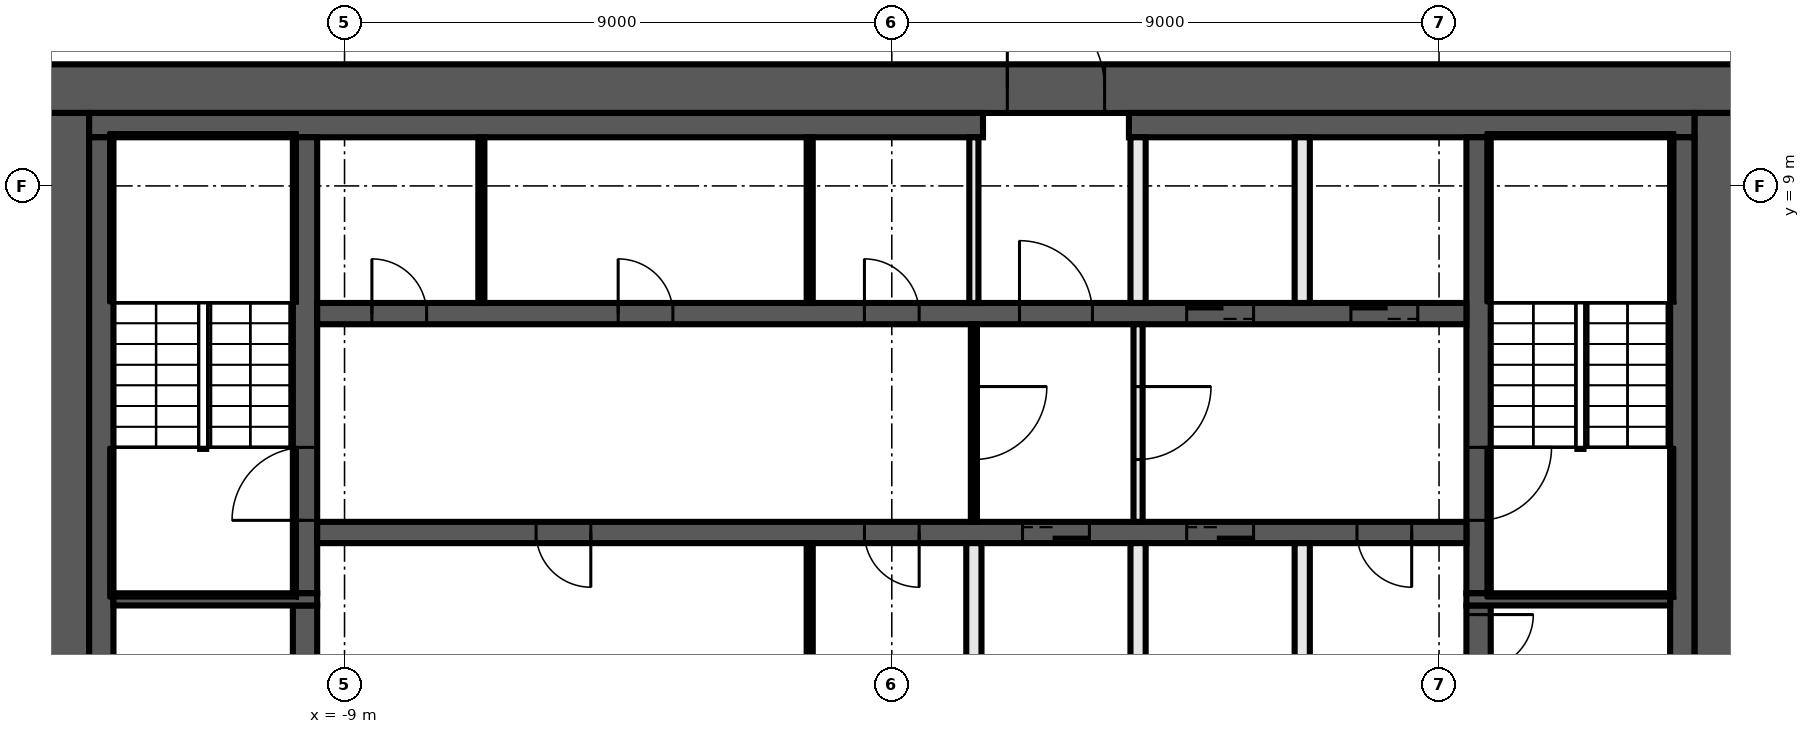
"""IFC4 building model, lengths in metres.
Left out: names, types, materials, properties, quantities, classifications, styles, units other than length and angle.
Written with IfcOpenShell. Run it as: python <this file> out.ifc"""

import sys

from ifc_helpers import new_model, si_unit, direction, frame, frame_2d, origin, place, context, subcontext, project, spatial, rectangle, extrude, element, fill, save


model = new_model("IFC4")
c1 = context("Model", 3, precision=1e-05, world=origin(), true_north=direction((0.0, 1.0)))
c2 = subcontext(c1, "Body", "Model", "MODEL_VIEW")
j1 = project(units=[si_unit("LENGTHUNIT", "METRE"), si_unit("PLANEANGLEUNIT", "RADIAN")], contexts=[c1])
p1 = place(None, origin())
s1 = spatial("IfcSite", under=j1, at=p1, CompositionType="ELEMENT")
p2 = place(p1, origin())
s2 = spatial("IfcBuilding", under=s1, at=p2, CompositionType="ELEMENT")
p3 = place(p2, frame((0.0, 0.0, 220.6)))
s3 = spatial("IfcBuildingStorey", under=s2, at=p3, CompositionType="ELEMENT", Elevation=220.6)
p4 = place(p3, frame((23.434, 8.496, 0.0), z_axis=(0.0, 0.0, 1.0), x_axis=(-0.676389444632, 0.736544173278, 0.0)))
e1 = element("IfcWall", 1, at=p4, inside=s3, PredefinedType="SOLIDWALL", context=c2, shape_type="SweptSolid", body=[
    extrude(rectangle(XDim=16.855, YDim=0.25, at=frame_2d((8.428, 0.0))), origin(), (0.0, 0.0, 1.0), 7.55),
])
p5 = place(p3, frame((-14.0, 10.6, 0.0), z_axis=(0.0, 0.0, 1.0), x_axis=(1.0, 0.0, 0.0)))
e2 = element("IfcWall", 2, at=p5, inside=s3, PredefinedType="SHEAR", context=c2, shape_type="SweptSolid", body=[
    extrude(rectangle(XDim=28.0, YDim=0.8, at=frame_2d((14.0, 0.0))), origin(), (0.0, 0.0, 1.0), 7.55),
])
p6 = place(p5, frame((15.9, 0.0, 0.0)))
e3 = element("IfcOpeningElement", 3, at=p6, cuts=e2, PredefinedType="OPENING", context=c2, shape_type="SweptSolid", body=[
    extrude(rectangle(XDim=1.6, YDim=2.1, at=frame_2d((0.8, 1.05))), frame((0.0, 0.41, 0.0), z_axis=(0.0, -1.0, 0.0), x_axis=(1.0, 0.0, 0.0)), (0.0, 0.0, 1.0), 0.82),
])
for number, where, z_axis, x_axis in (
    (4, (13.6, 10.2, 0.0), (0.0, 0.0, 1.0), (0.0, -1.0, 0.0)),
    (5, (-13.6, -10.2, 0.0), (0.0, 0.0, 1.0), (0.0, 1.0, 0.0)),
):
    element("IfcWall", number, at=place(p3, frame(where, z_axis=z_axis, x_axis=x_axis)), inside=s3, PredefinedType="SHEAR", context=c2, shape_type="SweptSolid", body=[
        extrude(rectangle(XDim=20.4, YDim=0.8, at=frame_2d((10.2, 0.0))), origin(), (0.0, 0.0, 1.0), 7.55),
    ])
p7 = place(p3, frame((-13.2, 10.0, 0.0), z_axis=(0.0, 0.0, 1.0), x_axis=(1.0, 0.0, 0.0)))
e6 = element("IfcWall", 6, at=p7, inside=s3, PredefinedType="SHEAR", context=c2, shape_type="SweptSolid", body=[
    extrude(rectangle(XDim=14.7, YDim=0.4, at=frame_2d((7.35, 0.0))), origin(), (0.0, 0.0, 1.0), 7.55),
])
p8 = place(p3, frame((3.9, 10.0, 0.0), z_axis=(0.0, 0.0, 1.0), x_axis=(1.0, 0.0, 0.0)))
e7 = element("IfcWall", 7, at=p8, inside=s3, PredefinedType="SHEAR", context=c2, shape_type="SweptSolid", body=[
    extrude(rectangle(XDim=9.3, YDim=0.4, at=frame_2d((4.65, 0.0))), origin(), (0.0, 0.0, 1.0), 7.55),
])
for number, where, z_axis, x_axis in (
    (8, (13.0, 9.8, 0.0), (0.0, 0.0, 1.0), (0.0, -1.0, 0.0)),
    (9, (-13.0, -9.8, 0.0), (0.0, 0.0, 1.0), (0.0, 1.0, 0.0)),
):
    element("IfcWall", number, at=place(p3, frame(where, z_axis=z_axis, x_axis=x_axis)), inside=s3, PredefinedType="SHEAR", context=c2, shape_type="SweptSolid", body=[
        extrude(rectangle(XDim=19.6, YDim=0.4, at=frame_2d((9.8, 0.0))), origin(), (0.0, 0.0, 1.0), 7.55),
    ])
p9 = place(p3, frame((9.65, 2.1, 0.0), z_axis=(0.0, 0.0, 1.0), x_axis=(0.0, -1.0, 0.0)))
e10 = element("IfcWall", 10, at=p9, inside=s3, PredefinedType="SHEAR", context=c2, shape_type="SweptSolid", body=[
    extrude(rectangle(XDim=4.2, YDim=0.4, at=frame_2d((2.1, 0.0))), origin(), (0.0, 0.0, 1.0), 7.55),
])
p10 = place(p9, frame((0.15, 0.0, 0.0)))
e11 = element("IfcOpeningElement", 11, at=p10, cuts=e10, PredefinedType="OPENING", context=c2, shape_type="SweptSolid", body=[
    extrude(rectangle(XDim=0.9, YDim=2.1, at=frame_2d((0.45, 1.05))), frame((0.0, 0.21, 0.0), z_axis=(0.0, -1.0, 0.0), x_axis=(1.0, 0.0, 0.0)), (0.0, 0.0, 1.0), 0.42),
])
p11 = place(p3, frame((9.65, 9.8, 0.0), z_axis=(0.0, 0.0, 1.0), x_axis=(0.0, -1.0, 0.0)))
e12 = element("IfcWall", 12, at=p11, inside=s3, PredefinedType="SHEAR", context=c2, shape_type="SweptSolid", body=[
    extrude(rectangle(XDim=7.5, YDim=0.4, at=frame_2d((3.75, 0.0))), origin(), (0.0, 0.0, 1.0), 7.55),
])
p12 = place(p11, frame((5.1, 0.0, 0.0)))
e13 = element("IfcOpeningElement", 13, at=p12, cuts=e12, PredefinedType="OPENING", context=c2, shape_type="SweptSolid", body=[
    extrude(rectangle(XDim=1.2, YDim=2.1, at=frame_2d((0.6, 1.05))), frame((0.0, 0.21, 0.0), z_axis=(0.0, -1.0, 0.0), x_axis=(1.0, 0.0, 0.0)), (0.0, 0.0, 1.0), 0.42),
])
p13 = place(p3, frame((-9.65, -2.1, 0.0), z_axis=(0.0, 0.0, 1.0), x_axis=(0.0, 1.0, 0.0)))
e14 = element("IfcWall", 14, at=p13, inside=s3, PredefinedType="SHEAR", context=c2, shape_type="SweptSolid", body=[
    extrude(rectangle(XDim=4.2, YDim=0.4, at=frame_2d((2.1, 0.0))), origin(), (0.0, 0.0, 1.0), 7.55),
])
p14 = place(p3, frame((-9.65, 2.3, 0.0), z_axis=(0.0, 0.0, 1.0), x_axis=(0.0, 1.0, 0.0)))
e15 = element("IfcWall", 15, at=p14, inside=s3, PredefinedType="SHEAR", context=c2, shape_type="SweptSolid", body=[
    extrude(rectangle(XDim=7.5, YDim=0.4, at=frame_2d((3.75, 0.0))), origin(), (0.0, 0.0, 1.0), 7.55),
])
p15 = place(p14, frame((1.2, 0.0, 0.0)))
e16 = element("IfcOpeningElement", 16, at=p15, cuts=e15, PredefinedType="OPENING", context=c2, shape_type="SweptSolid", body=[
    extrude(rectangle(XDim=1.2, YDim=2.1, at=frame_2d((0.6, 1.05))), frame((0.0, 0.21, 0.0), z_axis=(0.0, -1.0, 0.0), x_axis=(1.0, 0.0, 0.0)), (0.0, 0.0, 1.0), 0.42),
])
for number, where, z_axis, x_axis in (
    (17, (9.45, 2.2, 0.0), (0.0, 0.0, 1.0), (1.0, 0.0, 0.0)),
    (18, (-9.45, 2.2, 0.0), (0.0, 0.0, 1.0), (-1.0, 0.0, 0.0)),
):
    element("IfcWall", number, at=place(p3, frame(where, z_axis=z_axis, x_axis=x_axis)), inside=s3, PredefinedType="SHEAR", context=c2, shape_type="SweptSolid", body=[
        extrude(rectangle(XDim=3.35, YDim=0.2, at=frame_2d((1.675, 0.0))), origin(), (0.0, 0.0, 1.0), 7.55),
    ])
p16 = place(p3, frame((-9.45, 6.9, 0.0), z_axis=(0.0, 0.0, 1.0), x_axis=(1.0, 0.0, 0.0)))
e19 = element("IfcWall", 19, at=p16, inside=s3, PredefinedType="SHEAR", context=c2, shape_type="SweptSolid", body=[
    extrude(rectangle(XDim=18.9, YDim=0.35, at=frame_2d((9.45, 0.0))), origin(), (0.0, 0.0, 1.0), 7.55),
])
p17 = place(p16, frame((11.55, 0.0, 0.0)))
e20 = element("IfcOpeningElement", 20, at=p17, cuts=e19, PredefinedType="OPENING", context=c2, shape_type="SweptSolid", body=[
    extrude(rectangle(XDim=1.2, YDim=2.1, at=frame_2d((0.6, 1.05))), frame((0.0, 0.185, 0.0), z_axis=(0.0, -1.0, 0.0), x_axis=(1.0, 0.0, 0.0)), (0.0, 0.0, 1.0), 0.37),
])
p18 = place(p16, frame((14.3, 0.0, 0.0)))
e21 = element("IfcOpeningElement", 21, at=p18, cuts=e19, PredefinedType="OPENING", context=c2, shape_type="SweptSolid", body=[
    extrude(rectangle(XDim=1.1, YDim=2.1, at=frame_2d((0.55, 1.05))), frame((0.0, 0.185, 0.0), z_axis=(0.0, -1.0, 0.0), x_axis=(1.0, 0.0, 0.0)), (0.0, 0.0, 1.0), 0.37),
])
p19 = place(p16, frame((17.0, 0.0, 0.0)))
e22 = element("IfcOpeningElement", 22, at=p19, cuts=e19, PredefinedType="OPENING", context=c2, shape_type="SweptSolid", body=[
    extrude(rectangle(XDim=1.1, YDim=2.1, at=frame_2d((0.55, 1.05))), frame((0.0, 0.185, 0.0), z_axis=(0.0, -1.0, 0.0), x_axis=(1.0, 0.0, 0.0)), (0.0, 0.0, 1.0), 0.37),
])
p20 = place(p16, frame((0.9, 0.0, 0.0)))
e23 = element("IfcOpeningElement", 23, at=p20, cuts=e19, PredefinedType="OPENING", context=c2, shape_type="SweptSolid", body=[
    extrude(rectangle(XDim=0.9, YDim=2.1, at=frame_2d((0.45, 1.05))), frame((0.0, 0.185, 0.0), z_axis=(0.0, -1.0, 0.0), x_axis=(1.0, 0.0, 0.0)), (0.0, 0.0, 1.0), 0.37),
])
p21 = place(p16, frame((4.95, 0.0, 0.0)))
e24 = element("IfcOpeningElement", 24, at=p21, cuts=e19, PredefinedType="OPENING", context=c2, shape_type="SweptSolid", body=[
    extrude(rectangle(XDim=0.9, YDim=2.1, at=frame_2d((0.45, 1.05))), frame((0.0, 0.185, 0.0), z_axis=(0.0, -1.0, 0.0), x_axis=(1.0, 0.0, 0.0)), (0.0, 0.0, 1.0), 0.37),
])
p22 = place(p16, frame((9.0, 0.0, 0.0)))
e25 = element("IfcOpeningElement", 25, at=p22, cuts=e19, PredefinedType="OPENING", context=c2, shape_type="SweptSolid", body=[
    extrude(rectangle(XDim=0.9, YDim=2.1, at=frame_2d((0.45, 1.05))), frame((0.0, 0.185, 0.0), z_axis=(0.0, -1.0, 0.0), x_axis=(1.0, 0.0, 0.0)), (0.0, 0.0, 1.0), 0.37),
])
p23 = place(p3, frame((9.45, 3.3, 0.0), z_axis=(0.0, 0.0, 1.0), x_axis=(-1.0, 0.0, 0.0)))
e26 = element("IfcWall", 26, at=p23, inside=s3, PredefinedType="SHEAR", context=c2, shape_type="SweptSolid", body=[
    extrude(rectangle(XDim=18.9, YDim=0.35, at=frame_2d((9.45, 0.0))), origin(), (0.0, 0.0, 1.0), 7.55),
])
p24 = place(p23, frame((6.2, 0.0, 0.0)))
e27 = element("IfcOpeningElement", 27, at=p24, cuts=e26, PredefinedType="OPENING", context=c2, shape_type="SweptSolid", body=[
    extrude(rectangle(XDim=1.1, YDim=2.1, at=frame_2d((0.55, 1.05))), frame((0.0, 0.185, 0.0), z_axis=(0.0, -1.0, 0.0), x_axis=(1.0, 0.0, 0.0)), (0.0, 0.0, 1.0), 0.37),
])
p25 = place(p23, frame((3.5, 0.0, 0.0)))
e28 = element("IfcOpeningElement", 28, at=p25, cuts=e26, PredefinedType="OPENING", context=c2, shape_type="SweptSolid", body=[
    extrude(rectangle(XDim=1.1, YDim=2.1, at=frame_2d((0.55, 1.05))), frame((0.0, 0.185, 0.0), z_axis=(0.0, -1.0, 0.0), x_axis=(1.0, 0.0, 0.0)), (0.0, 0.0, 1.0), 0.37),
])
p26 = place(p23, frame((0.9, 0.0, 0.0)))
e29 = element("IfcOpeningElement", 29, at=p26, cuts=e26, PredefinedType="OPENING", context=c2, shape_type="SweptSolid", body=[
    extrude(rectangle(XDim=0.9, YDim=2.1, at=frame_2d((0.45, 1.05))), frame((0.0, 0.185, 0.0), z_axis=(0.0, -1.0, 0.0), x_axis=(1.0, 0.0, 0.0)), (0.0, 0.0, 1.0), 0.37),
])
p27 = place(p23, frame((14.4, 0.0, 0.0)))
e30 = element("IfcOpeningElement", 30, at=p27, cuts=e26, PredefinedType="OPENING", context=c2, shape_type="SweptSolid", body=[
    extrude(rectangle(XDim=0.9, YDim=2.1, at=frame_2d((0.45, 1.05))), frame((0.0, 0.185, 0.0), z_axis=(0.0, -1.0, 0.0), x_axis=(1.0, 0.0, 0.0)), (0.0, 0.0, 1.0), 0.37),
])
p28 = place(p23, frame((9.0, 0.0, 0.0)))
e31 = element("IfcOpeningElement", 31, at=p28, cuts=e26, PredefinedType="OPENING", context=c2, shape_type="SweptSolid", body=[
    extrude(rectangle(XDim=0.9, YDim=2.1, at=frame_2d((0.45, 1.05))), frame((0.0, 0.185, 0.0), z_axis=(0.0, -1.0, 0.0), x_axis=(1.0, 0.0, 0.0)), (0.0, 0.0, 1.0), 0.37),
])
for number, where, z_axis, x_axis in (
    (32, (6.75, 0.4, 0.0), (0.0, 0.0, 1.0), (0.0, 1.0, 0.0)),
    (33, (6.75, 7.075, 0.0), (0.0, 0.0, 1.0), (0.0, 1.0, 0.0)),
):
    element("IfcWall", number, at=place(p3, frame(where, z_axis=z_axis, x_axis=x_axis)), inside=s3, PredefinedType="SOLIDWALL", context=c2, shape_type="SweptSolid", body=[
        extrude(rectangle(XDim=2.725, YDim=0.25, at=frame_2d((1.363, 0.0))), origin(), (0.0, 0.0, 1.0), 7.55),
    ])
p29 = place(p3, frame((4.05, 6.725, 0.0), z_axis=(0.0, 0.0, 1.0), x_axis=(0.0, -1.0, 0.0)))
e34 = element("IfcWall", 34, at=p29, inside=s3, PredefinedType="PARTITIONING", context=c2, shape_type="SweptSolid", body=[
    extrude(rectangle(XDim=3.25, YDim=0.15, at=frame_2d((1.625, 0.0))), origin(), (0.0, 0.0, 1.0), 7.55),
])
p30 = place(p29, frame((1.025, 0.0, 0.0)))
e35 = element("IfcOpeningElement", 35, at=p30, cuts=e34, PredefinedType="OPENING", context=c2, shape_type="SweptSolid", body=[
    extrude(rectangle(XDim=1.2, YDim=2.1, at=frame_2d((0.6, 1.05))), frame((0.0, 0.085, 0.0), z_axis=(0.0, -1.0, 0.0), x_axis=(1.0, 0.0, 0.0)), (0.0, 0.0, 1.0), 0.17),
])
for number, where, z_axis, x_axis in (
    (36, (4.05, 0.4, 0.0), (0.0, 0.0, 1.0), (0.0, 1.0, 0.0)),
    (37, (4.05, 7.075, 0.0), (0.0, 0.0, 1.0), (0.0, 1.0, 0.0)),
):
    element("IfcWall", number, at=place(p3, frame(where, z_axis=z_axis, x_axis=x_axis)), inside=s3, PredefinedType="SOLIDWALL", context=c2, shape_type="SweptSolid", body=[
        extrude(rectangle(XDim=2.725, YDim=0.25, at=frame_2d((1.363, 0.0))), origin(), (0.0, 0.0, 1.0), 7.55),
    ])
p31 = place(p3, frame((1.35, 7.075, 0.0), z_axis=(0.0, 0.0, 1.0), x_axis=(0.0, 1.0, 0.0)))
e38 = element("IfcWall", 38, at=p31, inside=s3, PredefinedType="PARTITIONING", context=c2, shape_type="SweptSolid", body=[
    extrude(rectangle(XDim=2.725, YDim=0.15, at=frame_2d((1.363, 0.0))), origin(), (0.0, 0.0, 1.0), 7.55),
])
p32 = place(p3, frame((1.35, 6.725, 0.0), z_axis=(0.0, 0.0, 1.0), x_axis=(0.0, -1.0, 0.0)))
e39 = element("IfcWall", 39, at=p32, inside=s3, PredefinedType="PARTITIONING", context=c2, shape_type="SweptSolid", body=[
    extrude(rectangle(XDim=3.25, YDim=0.1, at=frame_2d((1.625, 0.0))), origin(), (0.0, 0.0, 1.0), 7.55),
])
p33 = place(p32, frame((1.025, 0.0, 0.0)))
e40 = element("IfcOpeningElement", 40, at=p33, cuts=e39, PredefinedType="OPENING", context=c2, shape_type="SweptSolid", body=[
    extrude(rectangle(XDim=1.2, YDim=2.1, at=frame_2d((0.6, 1.05))), frame((0.0, 0.06, 0.0), z_axis=(0.0, -1.0, 0.0), x_axis=(1.0, 0.0, 0.0)), (0.0, 0.0, 1.0), 0.12),
])
p34 = place(p3, frame((1.35, 0.4, 0.0), z_axis=(0.0, 0.0, 1.0), x_axis=(0.0, 1.0, 0.0)))
e41 = element("IfcWall", 41, at=p34, inside=s3, PredefinedType="SOLIDWALL", context=c2, shape_type="SweptSolid", body=[
    extrude(rectangle(XDim=2.725, YDim=0.25, at=frame_2d((1.363, 0.0))), origin(), (0.0, 0.0, 1.0), 7.55),
])
for number, where, z_axis, x_axis in (
    (42, (-1.35, 0.4, 0.0), (0.0, 0.0, 1.0), (0.0, 1.0, 0.0)),
    (43, (-1.35, 7.075, 0.0), (0.0, 0.0, 1.0), (0.0, 1.0, 0.0)),
    (44, (-6.75, 7.075, 0.0), (0.0, 0.0, 1.0), (0.0, 1.0, 0.0)),
):
    element("IfcWall", number, at=place(p3, frame(where, z_axis=z_axis, x_axis=x_axis)), inside=s3, PredefinedType="PARTITIONING", context=c2, shape_type="SweptSolid", body=[
        extrude(rectangle(XDim=2.725, YDim=0.1, at=frame_2d((1.363, 0.0))), origin(), (0.0, 0.0, 1.0), 7.55),
    ])
p35 = place(p10, origin())
e45 = element("IfcDoor", 45, at=p35, inside=s3, OperationType="SINGLE_SWING_RIGHT", PredefinedType="DOOR", context=c2, shape_type="SweptSolid", body=[
    extrude(rectangle(XDim=0.9, YDim=2.1, at=frame_2d((0.45, 1.05))), frame((0.0, 0.025, 0.0), z_axis=(0.0, -1.0, 0.0), x_axis=(1.0, 0.0, 0.0)), (0.0, 0.0, 1.0), 0.05),
])
fill(e11, e45)
p36 = place(p6, origin())
e46 = element("IfcDoor", 46, at=p36, inside=s3, OperationType="DOUBLE_DOOR_SINGLE_SWING", PredefinedType="DOOR", context=c2, shape_type="SweptSolid", body=[
    extrude(rectangle(XDim=1.6, YDim=2.1, at=frame_2d((0.8, 1.05))), frame((0.0, 0.025, 0.0), z_axis=(0.0, -1.0, 0.0), x_axis=(1.0, 0.0, 0.0)), (0.0, 0.0, 1.0), 0.05),
])
fill(e3, e46)
p37 = place(p17, origin())
e47 = element("IfcDoor", 47, at=p37, inside=s3, OperationType="SINGLE_SWING_LEFT", PredefinedType="DOOR", context=c2, shape_type="SweptSolid", body=[
    extrude(rectangle(XDim=1.2, YDim=2.1, at=frame_2d((0.6, 1.05))), frame((0.0, 0.025, 0.0), z_axis=(0.0, -1.0, 0.0), x_axis=(1.0, 0.0, 0.0)), (0.0, 0.0, 1.0), 0.05),
])
fill(e20, e47)
p38 = place(p18, origin())
e48 = element("IfcDoor", 48, at=p38, inside=s3, OperationType="DOUBLE_DOOR_SLIDING", PredefinedType="DOOR", context=c2, shape_type="SweptSolid", body=[
    extrude(rectangle(XDim=1.1, YDim=2.1, at=frame_2d((0.55, 1.05))), frame((0.0, 0.025, 0.0), z_axis=(0.0, -1.0, 0.0), x_axis=(1.0, 0.0, 0.0)), (0.0, 0.0, 1.0), 0.05),
])
fill(e21, e48)
p39 = place(p19, origin())
e49 = element("IfcDoor", 49, at=p39, inside=s3, OperationType="DOUBLE_DOOR_SLIDING", PredefinedType="DOOR", context=c2, shape_type="SweptSolid", body=[
    extrude(rectangle(XDim=1.1, YDim=2.1, at=frame_2d((0.55, 1.05))), frame((0.0, 0.025, 0.0), z_axis=(0.0, -1.0, 0.0), x_axis=(1.0, 0.0, 0.0)), (0.0, 0.0, 1.0), 0.05),
])
fill(e22, e49)
p40 = place(p24, origin())
e50 = element("IfcDoor", 50, at=p40, inside=s3, OperationType="DOUBLE_DOOR_SLIDING", PredefinedType="DOOR", context=c2, shape_type="SweptSolid", body=[
    extrude(rectangle(XDim=1.1, YDim=2.1, at=frame_2d((0.55, 1.05))), frame((0.0, 0.025, 0.0), z_axis=(0.0, -1.0, 0.0), x_axis=(1.0, 0.0, 0.0)), (0.0, 0.0, 1.0), 0.05),
])
fill(e27, e50)
p41 = place(p25, origin())
e51 = element("IfcDoor", 51, at=p41, inside=s3, OperationType="DOUBLE_DOOR_SLIDING", PredefinedType="DOOR", context=c2, shape_type="SweptSolid", body=[
    extrude(rectangle(XDim=1.1, YDim=2.1, at=frame_2d((0.55, 1.05))), frame((0.0, 0.025, 0.0), z_axis=(0.0, -1.0, 0.0), x_axis=(1.0, 0.0, 0.0)), (0.0, 0.0, 1.0), 0.05),
])
fill(e28, e51)
p42 = place(p26, origin())
e52 = element("IfcDoor", 52, at=p42, inside=s3, OperationType="SINGLE_SWING_LEFT", PredefinedType="DOOR", context=c2, shape_type="SweptSolid", body=[
    extrude(rectangle(XDim=0.9, YDim=2.1, at=frame_2d((0.45, 1.05))), frame((0.0, 0.025, 0.0), z_axis=(0.0, -1.0, 0.0), x_axis=(1.0, 0.0, 0.0)), (0.0, 0.0, 1.0), 0.05),
])
fill(e29, e52)
p43 = place(p20, origin())
e53 = element("IfcDoor", 53, at=p43, inside=s3, OperationType="SINGLE_SWING_RIGHT", PredefinedType="DOOR", context=c2, shape_type="SweptSolid", body=[
    extrude(rectangle(XDim=0.9, YDim=2.1, at=frame_2d((0.45, 1.05))), frame((0.0, 0.025, 0.0), z_axis=(0.0, -1.0, 0.0), x_axis=(1.0, 0.0, 0.0)), (0.0, 0.0, 1.0), 0.05),
])
fill(e23, e53)
p44 = place(p21, origin())
e54 = element("IfcDoor", 54, at=p44, inside=s3, OperationType="SINGLE_SWING_LEFT", PredefinedType="DOOR", context=c2, shape_type="SweptSolid", body=[
    extrude(rectangle(XDim=0.9, YDim=2.1, at=frame_2d((0.45, 1.05))), frame((0.0, 0.025, 0.0), z_axis=(0.0, -1.0, 0.0), x_axis=(1.0, 0.0, 0.0)), (0.0, 0.0, 1.0), 0.05),
])
fill(e24, e54)
p45 = place(p22, origin())
e55 = element("IfcDoor", 55, at=p45, inside=s3, OperationType="SINGLE_SWING_RIGHT", PredefinedType="DOOR", context=c2, shape_type="SweptSolid", body=[
    extrude(rectangle(XDim=0.9, YDim=2.1, at=frame_2d((0.45, 1.05))), frame((0.0, 0.025, 0.0), z_axis=(0.0, -1.0, 0.0), x_axis=(1.0, 0.0, 0.0)), (0.0, 0.0, 1.0), 0.05),
])
fill(e25, e55)
p46 = place(p27, origin())
e56 = element("IfcDoor", 56, at=p46, inside=s3, OperationType="SINGLE_SWING_LEFT", PredefinedType="DOOR", context=c2, shape_type="SweptSolid", body=[
    extrude(rectangle(XDim=0.9, YDim=2.1, at=frame_2d((0.45, 1.05))), frame((0.0, 0.025, 0.0), z_axis=(0.0, -1.0, 0.0), x_axis=(1.0, 0.0, 0.0)), (0.0, 0.0, 1.0), 0.05),
])
fill(e30, e56)
p47 = place(p28, origin())
e57 = element("IfcDoor", 57, at=p47, inside=s3, OperationType="SINGLE_SWING_RIGHT", PredefinedType="DOOR", context=c2, shape_type="SweptSolid", body=[
    extrude(rectangle(XDim=0.9, YDim=2.1, at=frame_2d((0.45, 1.05))), frame((0.0, 0.025, 0.0), z_axis=(0.0, -1.0, 0.0), x_axis=(1.0, 0.0, 0.0)), (0.0, 0.0, 1.0), 0.05),
])
fill(e31, e57)
p48 = place(p12, origin())
e58 = element("IfcDoor", 58, at=p48, inside=s3, OperationType="SINGLE_SWING_LEFT", PredefinedType="DOOR", context=c2, shape_type="SweptSolid", body=[
    extrude(rectangle(XDim=1.2, YDim=2.1, at=frame_2d((0.6, 1.05))), frame((0.0, 0.025, 0.0), z_axis=(0.0, -1.0, 0.0), x_axis=(1.0, 0.0, 0.0)), (0.0, 0.0, 1.0), 0.05),
])
fill(e13, e58)
p49 = place(p15, origin())
e59 = element("IfcDoor", 59, at=p49, inside=s3, OperationType="SINGLE_SWING_RIGHT", PredefinedType="DOOR", context=c2, shape_type="SweptSolid", body=[
    extrude(rectangle(XDim=1.2, YDim=2.1, at=frame_2d((0.6, 1.05))), frame((0.0, 0.025, 0.0), z_axis=(0.0, -1.0, 0.0), x_axis=(1.0, 0.0, 0.0)), (0.0, 0.0, 1.0), 0.05),
])
fill(e16, e59)
p50 = place(p33, origin())
e60 = element("IfcDoor", 60, at=p50, inside=s3, OperationType="SINGLE_SWING_LEFT", PredefinedType="DOOR", context=c2, shape_type="SweptSolid", body=[
    extrude(rectangle(XDim=1.2, YDim=2.1, at=frame_2d((0.6, 1.05))), frame((0.0, 0.025, 0.0), z_axis=(0.0, -1.0, 0.0), x_axis=(1.0, 0.0, 0.0)), (0.0, 0.0, 1.0), 0.05),
])
fill(e40, e60)
p51 = place(p30, origin())
e61 = element("IfcDoor", 61, at=p51, inside=s3, OperationType="SINGLE_SWING_RIGHT", PredefinedType="DOOR", context=c2, shape_type="SweptSolid", body=[
    extrude(rectangle(XDim=1.2, YDim=2.1, at=frame_2d((0.6, 1.05))), frame((0.0, 0.025, 0.0), z_axis=(0.0, -1.0, 0.0), x_axis=(1.0, 0.0, 0.0)), (0.0, 0.0, 1.0), 0.05),
])
fill(e35, e61)
save(model, sys.argv[1])
